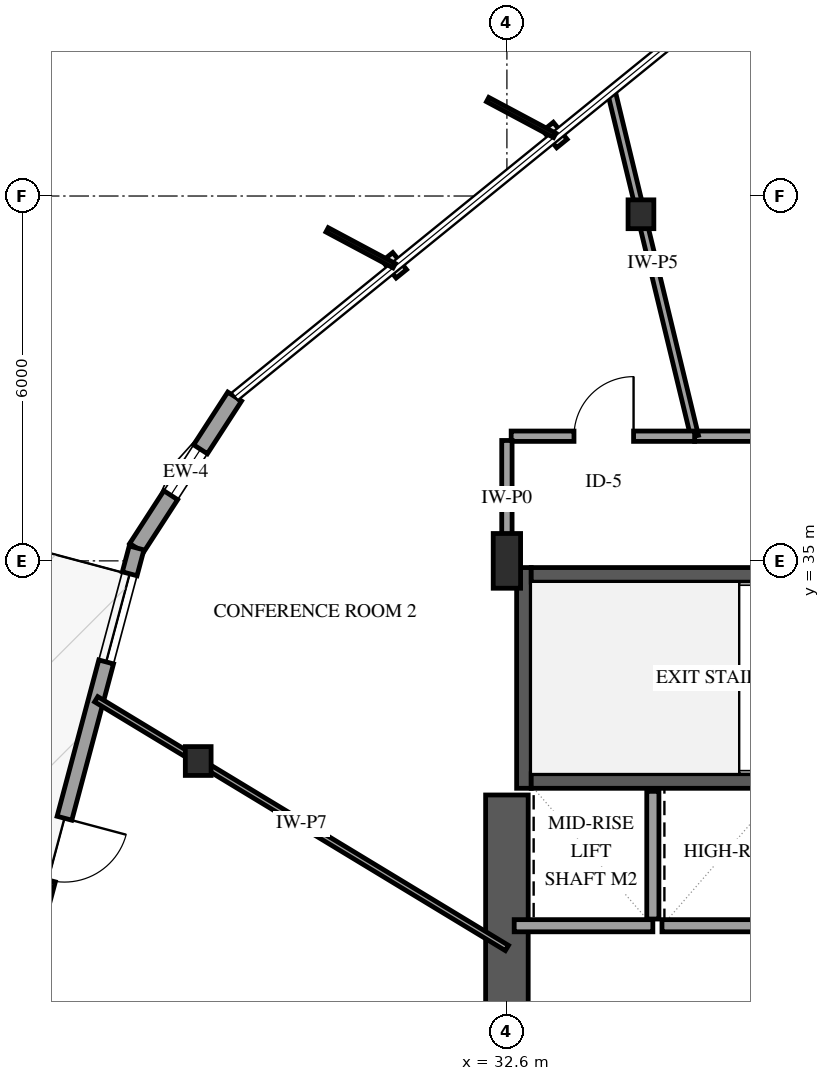
"""IFC4 building model, lengths in metres.
Left out: names, types, materials, properties, quantities, classifications, styles, units other than length and angle.
Written with IfcOpenShell. Run it as: python <this file> out.ifc"""

import sys

from ifc_helpers import new_model, si_unit, direction, frame, frame_2d, origin, origin_2d, place, context, subcontext, project, spatial, rectangle, i_section, extrude, element, fill, save


model = new_model("IFC4")
c1 = context("Model", 3, precision=1e-05, world=origin(), true_north=direction((0.0, 1.0)))
c2 = subcontext(c1, "Body", "Model", "MODEL_VIEW")
j1 = project(units=[si_unit("LENGTHUNIT", "METRE"), si_unit("PLANEANGLEUNIT", "RADIAN")], contexts=[c1])
p1 = place(None, origin())
s1 = spatial("IfcSite", under=j1, at=p1, CompositionType="ELEMENT")
p2 = place(p1, origin())
s2 = spatial("IfcBuilding", under=s1, at=p2, CompositionType="ELEMENT")
p3 = place(p2, frame((0.0, 0.0, 38.6)))
s3 = spatial("IfcBuildingStorey", under=s2, at=p3, CompositionType="ELEMENT", Elevation=38.6)
p4 = place(p3, frame((32.88, 31.26, 0.0), z_axis=(0.0, 0.0, 1.0), x_axis=(0.0, 1.0, 0.0)))
e1 = element("IfcWall", 1, at=p4, inside=s3, PredefinedType="SHEAR", context=c2, shape_type="SweptSolid", body=[
    extrude(rectangle(XDim=3.63, YDim=0.24, at=frame_2d((1.815, 0.0))), origin(), (0.0, 0.0, 1.0), 4.0),
])
for number, where, z_axis, x_axis in (
    (2, (33.0, 31.38, 0.0), (0.0, 0.0, 1.0), (1.0, 0.0, 0.0)),
    (3, (33.0, 34.77, 0.0), (0.0, 0.0, 1.0), (1.0, 0.0, 0.0)),
):
    element("IfcWall", number, at=place(p3, frame(where, z_axis=z_axis, x_axis=x_axis)), inside=s3, PredefinedType="SHEAR", context=c2, shape_type="SweptSolid", body=[
        extrude(rectangle(XDim=8.0, YDim=0.24, at=frame_2d((4.0, 0.0))), origin(), (0.0, 0.0, 1.0), 4.0),
    ])
p5 = place(p3, frame((32.6, 18.85, 0.0), z_axis=(0.0, 0.0, 1.0), x_axis=(0.0, 1.0, 0.0)))
e4 = element("IfcWall", 4, at=p5, inside=s3, PredefinedType="SHEAR", context=c2, shape_type="SweptSolid", body=[
    extrude(rectangle(XDim=12.3, YDim=0.7, at=frame_2d((6.15, 0.0))), origin(), (0.0, 0.0, 1.0), 4.0),
])
p6 = place(p3, frame((32.6, 35.0, 0.0), z_axis=(0.0, 0.0, 1.0), x_axis=(1.0, 0.0, 0.0)))
e5 = element("IfcColumn", 5, at=p6, inside=s3, PredefinedType="PILASTER", context=c2, shape_type="SweptSolid", body=[
    extrude(rectangle(XDim=0.45, YDim=0.9, at=origin_2d()), origin(), (0.0, 0.0, 1.0), 4.0),
])
for number, where, z_axis, x_axis in (
    (6, (34.804, 40.7, 0.0), (0.0, 0.0, 1.0), (1.0, 0.0, 0.0)),
    (7, (27.523, 31.708, 0.0), (0.0, 0.0, 1.0), (1.0, 0.0, 0.0)),
):
    element("IfcColumn", number, at=place(p3, frame(where, z_axis=z_axis, x_axis=x_axis)), inside=s3, PredefinedType="COLUMN", context=c2, shape_type="SweptSolid", body=[
        extrude(i_section(OverallWidth=0.424, OverallDepth=0.474, WebThickness=0.048, FlangeThickness=0.077, FilletRadius=0.038, at=origin_2d()), origin(), (0.0, 0.0, 1.0), 4.0),
    ])
p7 = place(p3, frame((28.123, 37.702, 0.0), z_axis=(0.0, 0.0, 1.0), x_axis=(-0.543732321815, -0.839258698027, 0.0)))
e8 = element("IfcWall", 8, at=p7, inside=s3, PredefinedType="SOLIDWALL", context=c2, shape_type="SweptSolid", body=[
    extrude(rectangle(XDim=2.967, YDim=0.27, at=frame_2d((1.483, 0.0))), origin(), (0.0, 0.0, 1.0), 3.079),
])
p8 = place(p7, frame((1.033, 0.0, 0.75)))
e9 = element("IfcOpeningElement", 9, at=p8, cuts=e8, PredefinedType="OPENING", context=c2, shape_type="SweptSolid", body=[
    extrude(rectangle(XDim=0.9, YDim=1.5, at=frame_2d((0.45, 0.75))), frame((0.0, 0.145, 0.0), z_axis=(0.0, -1.0, 0.0), x_axis=(1.0, 0.0, 0.0)), (0.0, 0.0, 1.0), 0.29),
])
p9 = place(p3, frame((26.51, 35.213, 0.0), z_axis=(0.0, 0.0, 1.0), x_axis=(-0.257827991611, -0.966190833501, 0.0)))
e10 = element("IfcWall", 10, at=p9, inside=s3, PredefinedType="SOLIDWALL", context=c2, shape_type="SweptSolid", body=[
    extrude(rectangle(XDim=10.201, YDim=0.25, at=frame_2d((5.101, 0.0))), origin(), (0.0, 0.0, 1.0), 3.079),
])
p10 = place(p9, frame((4.601, 0.0, 0.0)))
e11 = element("IfcOpeningElement", 11, at=p10, cuts=e10, PredefinedType="OPENING", context=c2, shape_type="SweptSolid", body=[
    extrude(rectangle(XDim=1.05, YDim=2.15, at=frame_2d((0.525, 1.075))), frame((0.0, 0.135, 0.0), z_axis=(0.0, -1.0, 0.0), x_axis=(1.0, 0.0, 0.0)), (0.0, 0.0, 1.0), 0.27),
])
p11 = place(p9, frame((0.44, 0.0, 0.72)))
e12 = element("IfcOpeningElement", 12, at=p11, cuts=e10, PredefinedType="OPENING", context=c2, shape_type="SweptSolid", body=[
    extrude(rectangle(XDim=1.5, YDim=1.7, at=frame_2d((0.75, 0.85))), frame((0.0, 0.135, 0.0), z_axis=(0.0, -1.0, 0.0), x_axis=(1.0, 0.0, 0.0)), (0.0, 0.0, 1.0), 0.27),
])
p12 = place(p9, frame((6.291, 0.0, 0.72)))
e13 = element("IfcOpeningElement", 13, at=p12, cuts=e10, PredefinedType="OPENING", context=c2, shape_type="SweptSolid", body=[
    extrude(rectangle(XDim=1.5, YDim=1.7, at=frame_2d((0.75, 0.85))), frame((0.0, 0.135, 0.0), z_axis=(0.0, -1.0, 0.0), x_axis=(1.0, 0.0, 0.0)), (0.0, 0.0, 1.0), 0.27),
])
p13 = place(p3, frame((32.72, 29.0, 0.0), z_axis=(0.0, 0.0, 1.0), x_axis=(1.0, 0.0, 0.0)))
e14 = element("IfcWall", 14, at=p13, inside=s3, PredefinedType="SOLIDWALL", context=c2, shape_type="SweptSolid", body=[
    extrude(rectangle(XDim=2.28, YDim=0.2, at=frame_2d((1.14, 0.0))), origin(), (0.0, 0.0, 1.0), 3.7),
])
p14 = place(p3, frame((35.0, 29.11, 0.0), z_axis=(0.0, 0.0, 1.0), x_axis=(0.0, 1.0, 0.0)))
e15 = element("IfcWall", 15, at=p14, inside=s3, PredefinedType="SOLIDWALL", context=c2, shape_type="SweptSolid", body=[
    extrude(rectangle(XDim=2.1, YDim=0.2, at=frame_2d((1.05, 0.0))), origin(), (0.0, 0.0, 1.0), 3.7),
])
p15 = place(p3, frame((35.15, 29.0, 0.0), z_axis=(0.0, 0.0, 1.0), x_axis=(1.0, 0.0, 0.0)))
e16 = element("IfcWall", 16, at=p15, inside=s3, PredefinedType="SOLIDWALL", context=c2, shape_type="SweptSolid", body=[
    extrude(rectangle(XDim=2.0, YDim=0.2, at=frame_2d((1.0, 0.0))), origin(), (0.0, 0.0, 1.0), 3.7),
])
p16 = place(p3, frame((35.687, 37.05, 0.0), z_axis=(0.0, 0.0, 1.0), x_axis=(1.0, 0.0, 0.0)))
e17 = element("IfcWall", 17, at=p16, inside=s3, PredefinedType="PARTITIONING", context=c2, shape_type="SweptSolid", body=[
    extrude(rectangle(XDim=10.893, YDim=0.17, at=frame_2d((5.447, 0.0))), origin(), (0.0, 0.0, 1.0), 3.7),
])
p17 = place(p16, frame((4.972, 0.0, 0.0)))
e18 = element("IfcOpeningElement", 18, at=p17, cuts=e17, PredefinedType="OPENING", context=c2, shape_type="SweptSolid", body=[
    extrude(rectangle(XDim=0.98, YDim=2.15, at=frame_2d((0.49, 1.075))), frame((0.0, 0.095, 0.0), z_axis=(0.0, -1.0, 0.0), x_axis=(1.0, 0.0, 0.0)), (0.0, 0.0, 1.0), 0.19),
])
p18 = place(p3, frame((32.6, 28.634, 0.0), z_axis=(0.0, 0.0, 1.0), x_axis=(-0.855385077894, 0.517992633651, 0.0)))
e19 = element("IfcWall", 19, at=p18, inside=s3, PredefinedType="PARTITIONING", context=c2, shape_type="SweptSolid", body=[
    extrude(rectangle(XDim=7.896, YDim=0.1, at=frame_2d((3.948, 0.0))), origin(), (0.0, 0.0, 1.0), 3.7),
])
p19 = place(p3, frame((35.687, 37.05, 0.0), z_axis=(0.0, 0.0, 1.0), x_axis=(-0.234925196883, 0.972013452515, 0.0)))
e20 = element("IfcWall", 20, at=p19, inside=s3, PredefinedType="PARTITIONING", context=c2, shape_type="SweptSolid", body=[
    extrude(rectangle(XDim=5.841, YDim=0.13, at=frame_2d((2.92, 0.0))), origin(), (0.0, 0.0, 1.0), 2.995),
])
p20 = place(p3, frame((32.67, 37.05, 0.0), z_axis=(0.0, 0.0, 1.0), x_axis=(1.0, 0.0, 0.0)))
e21 = element("IfcWall", 21, at=p20, inside=s3, PredefinedType="PARTITIONING", context=c2, shape_type="SweptSolid", body=[
    extrude(rectangle(XDim=3.017, YDim=0.17, at=frame_2d((1.509, 0.0))), origin(), (0.0, 0.0, 1.0), 3.7),
])
p21 = place(p20, frame((1.033, 0.0, 0.0)))
e22 = element("IfcOpeningElement", 22, at=p21, cuts=e21, PredefinedType="OPENING", context=c2, shape_type="SweptSolid", body=[
    extrude(rectangle(XDim=0.98, YDim=2.15, at=frame_2d((0.49, 1.075))), frame((0.0, 0.095, 0.0), z_axis=(0.0, -1.0, 0.0), x_axis=(1.0, 0.0, 0.0)), (0.0, 0.0, 1.0), 0.19),
])
p22 = place(p3, frame((32.6, 35.07, 0.0), z_axis=(0.0, 0.0, 1.0), x_axis=(0.0, 1.0, 0.0)))
e23 = element("IfcWall", 23, at=p22, inside=s3, PredefinedType="PARTITIONING", context=c2, shape_type="SweptSolid", body=[
    extrude(rectangle(XDim=1.91, YDim=0.17, at=frame_2d((0.955, 0.0))), origin(), (0.0, 0.0, 1.0), 3.7),
])
p23 = place(p8, origin())
e24 = element("IfcWindow", 24, at=p23, inside=s3, PartitioningType="SINGLE_PANEL", PredefinedType="WINDOW", context=c2, shape_type="SweptSolid", body=[
    extrude(rectangle(XDim=0.9, YDim=1.5, at=frame_2d((0.45, 0.75))), frame((0.0, 0.03, 0.0), z_axis=(0.0, -1.0, 0.0), x_axis=(1.0, 0.0, 0.0)), (0.0, 0.0, 1.0), 0.06),
])
fill(e9, e24)
p24 = place(p10, origin())
e25 = element("IfcDoor", 25, at=p24, inside=s3, OperationType="SINGLE_SWING_LEFT", PredefinedType="DOOR", context=c2, shape_type="SweptSolid", body=[
    extrude(rectangle(XDim=1.05, YDim=2.15, at=frame_2d((0.525, 1.075))), frame((0.0, 0.025, 0.0), z_axis=(0.0, -1.0, 0.0), x_axis=(1.0, 0.0, 0.0)), (0.0, 0.0, 1.0), 0.05),
])
fill(e11, e25)
p25 = place(p11, origin())
e26 = element("IfcWindow", 26, at=p25, inside=s3, PartitioningType="SINGLE_PANEL", PredefinedType="WINDOW", context=c2, shape_type="SweptSolid", body=[
    extrude(rectangle(XDim=1.5, YDim=1.7, at=frame_2d((0.75, 0.85))), frame((0.0, 0.03, 0.0), z_axis=(0.0, -1.0, 0.0), x_axis=(1.0, 0.0, 0.0)), (0.0, 0.0, 1.0), 0.06),
])
fill(e12, e26)
p26 = place(p21, origin())
e27 = element("IfcDoor", 27, at=p26, inside=s3, OperationType="SINGLE_SWING_RIGHT", PredefinedType="DOOR", context=c2, shape_type="SweptSolid", body=[
    extrude(rectangle(XDim=0.98, YDim=2.15, at=frame_2d((0.49, 1.075))), frame((0.0, 0.025, 0.0), z_axis=(0.0, -1.0, 0.0), x_axis=(1.0, 0.0, 0.0)), (0.0, 0.0, 1.0), 0.05),
])
fill(e22, e27)
save(model, sys.argv[1])
